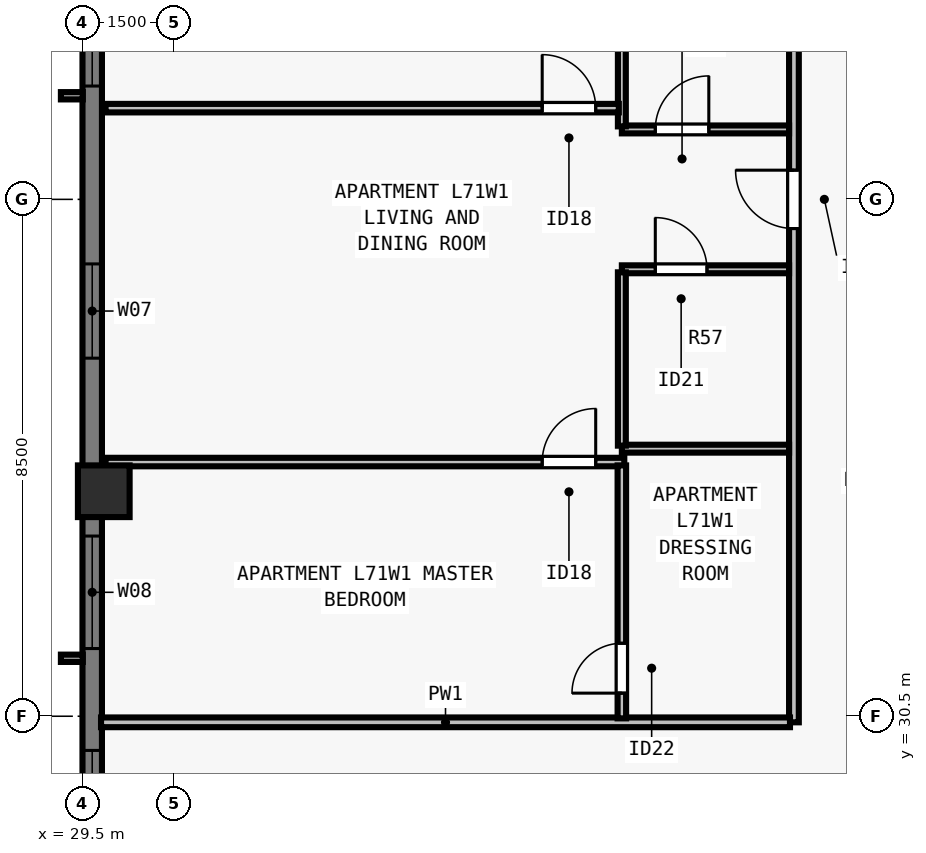
"""IFC4 building model, lengths in metres.
Left out: names, types, materials, properties, quantities, classifications, styles, units other than length and angle.
Written with IfcOpenShell. Run it as: python <this file> out.ifc"""

import sys

from ifc_helpers import new_model, si_unit, direction, frame, frame_2d, origin, origin_2d, place, context, subcontext, project, spatial, rectangle, extrude, element, fill, save


model = new_model("IFC4")
c1 = context("Model", 3, precision=1e-05, world=origin(), true_north=direction((0.0, 1.0)))
c2 = subcontext(c1, "Body", "Model", "MODEL_VIEW")
j1 = project(units=[si_unit("LENGTHUNIT", "METRE"), si_unit("PLANEANGLEUNIT", "RADIAN")], contexts=[c1])
p1 = place(None, origin())
s1 = spatial("IfcSite", under=j1, at=p1, CompositionType="ELEMENT")
p2 = place(p1, origin())
s2 = spatial("IfcBuilding", under=s1, at=p2, CompositionType="ELEMENT")
p3 = place(p2, frame((0.0, 0.0, 258.5)))
s3 = spatial("IfcBuildingStorey", under=s2, at=p3, CompositionType="ELEMENT", Elevation=258.5)
p4 = place(p3, frame((29.85, 34.2, 0.0), z_axis=(0.0, 0.0, 1.0), x_axis=(0.0, 1.0, 0.0)))
e1 = element("IfcColumn", 1, at=p4, inside=s3, PredefinedType="COLUMN", context=c2, shape_type="SweptSolid", body=[
    extrude(rectangle(XDim=0.85, YDim=0.85, at=origin_2d()), origin(), (0.0, 0.0, 1.0), 3.5),
])
p5 = place(p3, frame((29.66, 21.5, 0.0), z_axis=(0.0, 0.0, 1.0), x_axis=(0.0, 1.0, 0.0)))
e2 = element("IfcWall", 2, at=p5, inside=s3, PredefinedType="SOLIDWALL", context=c2, shape_type="SweptSolid", body=[
    extrude(rectangle(XDim=34.702, YDim=0.32, at=frame_2d((17.351, 0.0))), origin(), (0.0, 0.0, 1.0), 3.29),
])
p6 = place(p5, frame((4.163, 0.0, 0.8)))
e3 = element("IfcOpeningElement", 3, at=p6, cuts=e2, PredefinedType="OPENING", context=c2, shape_type="SweptSolid", body=[
    extrude(rectangle(XDim=1.85, YDim=1.678, at=frame_2d((0.925, 0.839))), frame((0.0, 0.17, 0.0), z_axis=(0.0, -1.0, 0.0), x_axis=(1.0, 0.0, 0.0)), (0.0, 0.0, 1.0), 0.34),
])
p7 = place(p5, frame((6.888, 0.0, 0.8)))
e4 = element("IfcOpeningElement", 4, at=p7, cuts=e2, PredefinedType="OPENING", context=c2, shape_type="SweptSolid", body=[
    extrude(rectangle(XDim=1.55, YDim=1.678, at=frame_2d((0.775, 0.839))), frame((0.0, 0.17, 0.0), z_axis=(0.0, -1.0, 0.0), x_axis=(1.0, 0.0, 0.0)), (0.0, 0.0, 1.0), 0.34),
])
p8 = place(p5, frame((10.113, 0.0, 0.8)))
e5 = element("IfcOpeningElement", 5, at=p8, cuts=e2, PredefinedType="OPENING", context=c2, shape_type="SweptSolid", body=[
    extrude(rectangle(XDim=1.85, YDim=1.678, at=frame_2d((0.925, 0.839))), frame((0.0, 0.17, 0.0), z_axis=(0.0, -1.0, 0.0), x_axis=(1.0, 0.0, 0.0)), (0.0, 0.0, 1.0), 0.34),
])
p9 = place(p5, frame((14.888, 0.0, 0.8)))
e6 = element("IfcOpeningElement", 6, at=p9, cuts=e2, PredefinedType="OPENING", context=c2, shape_type="SweptSolid", body=[
    extrude(rectangle(XDim=1.55, YDim=1.678, at=frame_2d((0.775, 0.839))), frame((0.0, 0.17, 0.0), z_axis=(0.0, -1.0, 0.0), x_axis=(1.0, 0.0, 0.0)), (0.0, 0.0, 1.0), 0.34),
])
p10 = place(p5, frame((19.364, 0.0, 0.8)))
e7 = element("IfcOpeningElement", 7, at=p10, cuts=e2, PredefinedType="OPENING", context=c2, shape_type="SweptSolid", body=[
    extrude(rectangle(XDim=1.85, YDim=1.678, at=frame_2d((0.925, 0.839))), frame((0.0, 0.17, 0.0), z_axis=(0.0, -1.0, 0.0), x_axis=(1.0, 0.0, 0.0)), (0.0, 0.0, 1.0), 0.34),
])
p11 = place(p5, frame((23.614, 0.0, 0.8)))
e8 = element("IfcOpeningElement", 8, at=p11, cuts=e2, PredefinedType="OPENING", context=c2, shape_type="SweptSolid", body=[
    extrude(rectangle(XDim=1.85, YDim=1.678, at=frame_2d((0.925, 0.839))), frame((0.0, 0.17, 0.0), z_axis=(0.0, -1.0, 0.0), x_axis=(1.0, 0.0, 0.0)), (0.0, 0.0, 1.0), 0.34),
])
p12 = place(p5, frame((31.35, 0.0, 0.8)))
e9 = element("IfcOpeningElement", 9, at=p12, cuts=e2, PredefinedType="OPENING", context=c2, shape_type="SweptSolid", body=[
    extrude(rectangle(XDim=0.9, YDim=1.678, at=frame_2d((0.45, 0.839))), frame((0.0, 0.17, 0.0), z_axis=(0.0, -1.0, 0.0), x_axis=(1.0, 0.0, 0.0)), (0.0, 0.0, 1.0), 0.34),
])
p13 = place(p3, frame((41.2, 30.4, 0.0), z_axis=(0.0, 0.0, 1.0), x_axis=(0.0, 1.0, 0.0)))
e10 = element("IfcWall", 10, at=p13, inside=s3, PredefinedType="PARTITIONING", context=c2, shape_type="SweptSolid", body=[
    extrude(rectangle(XDim=17.2, YDim=0.16, at=frame_2d((8.6, 0.0))), origin(), (0.0, 0.0, 1.0), 3.29),
])
p14 = place(p13, frame((8.12, 0.0, 0.0)))
e11 = element("IfcOpeningElement", 11, at=p14, cuts=e10, PredefinedType="OPENING", context=c2, shape_type="SweptSolid", body=[
    extrude(rectangle(XDim=0.96, YDim=2.18, at=frame_2d((0.48, 1.09))), frame((0.0, 0.09, 0.0), z_axis=(0.0, -1.0, 0.0), x_axis=(1.0, 0.0, 0.0)), (0.0, 0.0, 1.0), 0.18),
])
p15 = place(p3, frame((29.805, 30.4, 0.0), z_axis=(0.0, 0.0, 1.0), x_axis=(1.0, 0.0, 0.0)))
e12 = element("IfcWall", 12, at=p15, inside=s3, PredefinedType="PARTITIONING", context=c2, shape_type="SweptSolid", body=[
    extrude(rectangle(XDim=11.33, YDim=0.16, at=frame_2d((5.665, 0.0))), origin(), (0.0, 0.0, 1.0), 3.29),
])
p16 = place(p3, frame((38.37, 34.9, 0.0), z_axis=(0.0, 0.0, 1.0), x_axis=(1.0, 0.0, 0.0)))
e13 = element("IfcWall", 13, at=p16, inside=s3, PredefinedType="PLUMBINGWALL", context=c2, shape_type="SweptSolid", body=[
    extrude(rectangle(XDim=2.75, YDim=0.13, at=frame_2d((1.375, 0.0))), origin(), (0.0, 0.0, 1.0), 3.29),
])
p17 = place(p3, frame((38.37, 37.85, 0.0), z_axis=(0.0, 0.0, 1.0), x_axis=(1.0, 0.0, 0.0)))
e14 = element("IfcWall", 14, at=p17, inside=s3, PredefinedType="PLUMBINGWALL", context=c2, shape_type="SweptSolid", body=[
    extrude(rectangle(XDim=2.75, YDim=0.13, at=frame_2d((1.375, 0.0))), origin(), (0.0, 0.0, 1.0), 3.29),
])
p18 = place(p17, frame((0.55, 0.0, 0.0)))
e15 = element("IfcOpeningElement", 15, at=p18, cuts=e14, PredefinedType="OPENING", context=c2, shape_type="SweptSolid", body=[
    extrude(rectangle(XDim=0.85, YDim=2.08, at=frame_2d((0.425, 1.04))), frame((0.0, 0.075, 0.0), z_axis=(0.0, -1.0, 0.0), x_axis=(1.0, 0.0, 0.0)), (0.0, 0.0, 1.0), 0.15),
])
p19 = place(p3, frame((38.37, 34.95, 0.0), z_axis=(0.0, 0.0, 1.0), x_axis=(0.0, 1.0, 0.0)))
e16 = element("IfcWall", 16, at=p19, inside=s3, PredefinedType="PLUMBINGWALL", context=c2, shape_type="SweptSolid", body=[
    extrude(rectangle(XDim=2.85, YDim=0.13, at=frame_2d((1.425, 0.0))), origin(), (0.0, 0.0, 1.0), 3.29),
])
p20 = place(p3, frame((38.37, 40.15, 0.0), z_axis=(0.0, 0.0, 1.0), x_axis=(1.0, 0.0, 0.0)))
e17 = element("IfcWall", 17, at=p20, inside=s3, PredefinedType="PLUMBINGWALL", context=c2, shape_type="SweptSolid", body=[
    extrude(rectangle(XDim=2.75, YDim=0.13, at=frame_2d((1.375, 0.0))), origin(), (0.0, 0.0, 1.0), 3.29),
])
p21 = place(p20, frame((0.55, 0.0, 0.0)))
e18 = element("IfcOpeningElement", 18, at=p21, cuts=e17, PredefinedType="OPENING", context=c2, shape_type="SweptSolid", body=[
    extrude(rectangle(XDim=0.88, YDim=2.1, at=frame_2d((0.44, 1.05))), frame((0.0, 0.075, 0.0), z_axis=(0.0, -1.0, 0.0), x_axis=(1.0, 0.0, 0.0)), (0.0, 0.0, 1.0), 0.15),
])
p22 = place(p3, frame((38.37, 40.2, 0.0), z_axis=(0.0, 0.0, 1.0), x_axis=(0.0, 1.0, 0.0)))
e19 = element("IfcWall", 19, at=p22, inside=s3, PredefinedType="PLUMBINGWALL", context=c2, shape_type="SweptSolid", body=[
    extrude(rectangle(XDim=3.15, YDim=0.13, at=frame_2d((1.575, 0.0))), origin(), (0.0, 0.0, 1.0), 3.29),
])
p23 = place(p3, frame((29.88, 34.68, 0.0), z_axis=(0.0, 0.0, 1.0), x_axis=(1.0, 0.0, 0.0)))
e20 = element("IfcWall", 20, at=p23, inside=s3, PredefinedType="PARTITIONING", context=c2, shape_type="SweptSolid", body=[
    extrude(rectangle(XDim=8.53, YDim=0.14, at=frame_2d((4.265, 0.0))), origin(), (0.0, 0.0, 1.0), 2.958),
])
p24 = place(p23, frame((7.18, 0.0, 0.0)))
e21 = element("IfcOpeningElement", 21, at=p24, cuts=e20, PredefinedType="OPENING", context=c2, shape_type="SweptSolid", body=[
    extrude(rectangle(XDim=0.88, YDim=2.1, at=frame_2d((0.44, 1.05))), frame((0.0, 0.08, 0.0), z_axis=(0.0, -1.0, 0.0), x_axis=(1.0, 0.0, 0.0)), (0.0, 0.0, 1.0), 0.16),
])
p25 = place(p3, frame((38.37, 30.465, 0.0), z_axis=(0.0, 0.0, 1.0), x_axis=(0.0, 1.0, 0.0)))
e22 = element("IfcWall", 22, at=p25, inside=s3, PredefinedType="PARTITIONING", context=c2, shape_type="SweptSolid", body=[
    extrude(rectangle(XDim=4.16, YDim=0.14, at=frame_2d((2.08, 0.0))), origin(), (0.0, 0.0, 1.0), 3.29),
])
p26 = place(p25, frame((0.415, 0.0, 0.0)))
e23 = element("IfcOpeningElement", 23, at=p26, cuts=e22, PredefinedType="OPENING", context=c2, shape_type="SweptSolid", body=[
    extrude(rectangle(XDim=0.82, YDim=2.1, at=frame_2d((0.41, 1.05))), frame((0.0, 0.08, 0.0), z_axis=(0.0, -1.0, 0.0), x_axis=(1.0, 0.0, 0.0)), (0.0, 0.0, 1.0), 0.16),
])
p27 = place(p3, frame((29.88, 40.5, 0.0), z_axis=(0.0, 0.0, 1.0), x_axis=(1.0, 0.0, 0.0)))
e24 = element("IfcWall", 24, at=p27, inside=s3, PredefinedType="PARTITIONING", context=c2, shape_type="SweptSolid", body=[
    extrude(rectangle(XDim=8.44, YDim=0.14, at=frame_2d((4.22, 0.0))), origin(), (0.0, 0.0, 1.0), 2.958),
])
p28 = place(p27, frame((7.18, 0.0, 0.0)))
e25 = element("IfcOpeningElement", 25, at=p28, cuts=e24, PredefinedType="OPENING", context=c2, shape_type="SweptSolid", body=[
    extrude(rectangle(XDim=0.88, YDim=2.1, at=frame_2d((0.44, 1.05))), frame((0.0, 0.08, 0.0), z_axis=(0.0, -1.0, 0.0), x_axis=(1.0, 0.0, 0.0)), (0.0, 0.0, 1.0), 0.16),
])
p29 = place(p7, origin())
e26 = element("IfcWindow", 26, at=p29, inside=s3, PartitioningType="SINGLE_PANEL", PredefinedType="WINDOW", context=c2, shape_type="SweptSolid", body=[
    extrude(rectangle(XDim=1.55, YDim=1.678, at=frame_2d((0.775, 0.839))), frame((0.0, -0.05, 0.0), z_axis=(0.0, -1.0, 0.0), x_axis=(1.0, 0.0, 0.0)), (0.0, 0.0, 1.0), 0.06),
])
fill(e4, e26)
p30 = place(p8, origin())
e27 = element("IfcWindow", 27, at=p30, inside=s3, PartitioningType="SINGLE_PANEL", PredefinedType="WINDOW", context=c2, shape_type="SweptSolid", body=[
    extrude(rectangle(XDim=1.85, YDim=1.678, at=frame_2d((0.925, 0.839))), frame((0.0, -0.05, 0.0), z_axis=(0.0, -1.0, 0.0), x_axis=(1.0, 0.0, 0.0)), (0.0, 0.0, 1.0), 0.06),
])
fill(e5, e27)
p31 = place(p9, origin())
e28 = element("IfcWindow", 28, at=p31, inside=s3, PartitioningType="SINGLE_PANEL", PredefinedType="WINDOW", context=c2, shape_type="SweptSolid", body=[
    extrude(rectangle(XDim=1.55, YDim=1.678, at=frame_2d((0.775, 0.839))), frame((0.0, -0.05, 0.0), z_axis=(0.0, -1.0, 0.0), x_axis=(1.0, 0.0, 0.0)), (0.0, 0.0, 1.0), 0.06),
])
fill(e6, e28)
p32 = place(p10, origin())
e29 = element("IfcWindow", 29, at=p32, inside=s3, PartitioningType="SINGLE_PANEL", PredefinedType="WINDOW", context=c2, shape_type="SweptSolid", body=[
    extrude(rectangle(XDim=1.85, YDim=1.678, at=frame_2d((0.925, 0.839))), frame((0.0, -0.05, 0.0), z_axis=(0.0, -1.0, 0.0), x_axis=(1.0, 0.0, 0.0)), (0.0, 0.0, 1.0), 0.06),
])
fill(e7, e29)
p33 = place(p18, origin())
e30 = element("IfcDoor", 30, at=p33, inside=s3, OperationType="SINGLE_SWING_LEFT", PredefinedType="DOOR", context=c2, shape_type="SweptSolid", body=[
    extrude(rectangle(XDim=0.85, YDim=2.08, at=frame_2d((0.425, 1.04))), frame((0.0, 0.025, 0.0), z_axis=(0.0, -1.0, 0.0), x_axis=(1.0, 0.0, 0.0)), (0.0, 0.0, 1.0), 0.05),
])
fill(e15, e30)
p34 = place(p21, origin())
e31 = element("IfcDoor", 31, at=p34, inside=s3, OperationType="SINGLE_SWING_RIGHT", PredefinedType="DOOR", context=c2, shape_type="SweptSolid", body=[
    extrude(rectangle(XDim=0.88, YDim=2.1, at=frame_2d((0.44, 1.05))), frame((0.0, 0.025, 0.0), z_axis=(0.0, -1.0, 0.0), x_axis=(1.0, 0.0, 0.0)), (0.0, 0.0, 1.0), 0.05),
])
fill(e18, e31)
p35 = place(p26, origin())
e32 = element("IfcDoor", 32, at=p35, inside=s3, OperationType="SINGLE_SWING_LEFT", PredefinedType="DOOR", context=c2, shape_type="SweptSolid", body=[
    extrude(rectangle(XDim=0.82, YDim=2.1, at=frame_2d((0.41, 1.05))), frame((0.0, 0.025, 0.0), z_axis=(0.0, -1.0, 0.0), x_axis=(1.0, 0.0, 0.0)), (0.0, 0.0, 1.0), 0.05),
])
fill(e23, e32)
p36 = place(p24, origin())
e33 = element("IfcDoor", 33, at=p36, inside=s3, OperationType="SINGLE_SWING_RIGHT", PredefinedType="DOOR", context=c2, shape_type="SweptSolid", body=[
    extrude(rectangle(XDim=0.88, YDim=2.1, at=frame_2d((0.44, 1.05))), frame((0.0, 0.025, 0.0), z_axis=(0.0, -1.0, 0.0), x_axis=(1.0, 0.0, 0.0)), (0.0, 0.0, 1.0), 0.05),
])
fill(e21, e33)
p37 = place(p28, origin())
e34 = element("IfcDoor", 34, at=p37, inside=s3, OperationType="SINGLE_SWING_LEFT", PredefinedType="DOOR", context=c2, shape_type="SweptSolid", body=[
    extrude(rectangle(XDim=0.88, YDim=2.1, at=frame_2d((0.44, 1.05))), frame((0.0, 0.025, 0.0), z_axis=(0.0, -1.0, 0.0), x_axis=(1.0, 0.0, 0.0)), (0.0, 0.0, 1.0), 0.05),
])
fill(e25, e34)
p38 = place(p14, origin())
e35 = element("IfcDoor", 35, at=p38, inside=s3, OperationType="SINGLE_SWING_RIGHT", PredefinedType="DOOR", context=c2, shape_type="SweptSolid", body=[
    extrude(rectangle(XDim=0.96, YDim=2.18, at=frame_2d((0.48, 1.09))), frame((0.0, 0.025, 0.0), z_axis=(0.0, -1.0, 0.0), x_axis=(1.0, 0.0, 0.0)), (0.0, 0.0, 1.0), 0.05),
])
fill(e11, e35)
save(model, sys.argv[1])
